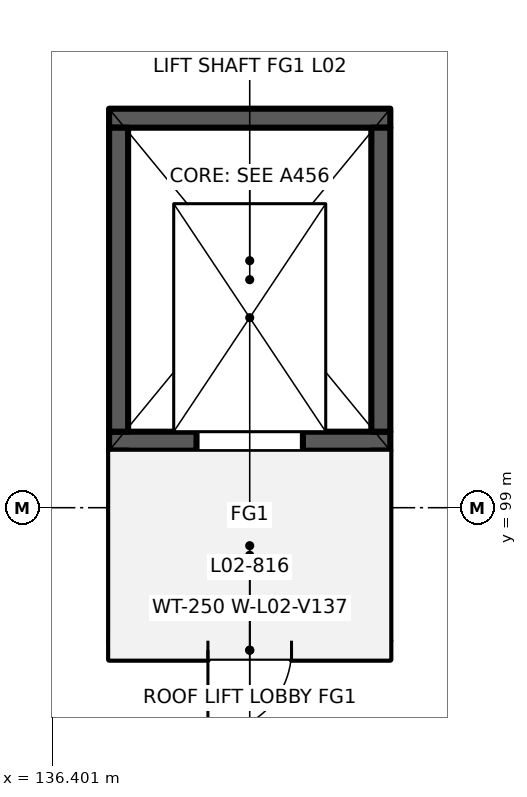
"""IFC4 building model, lengths in metres.
Left out: names, types, materials, properties, quantities, classifications, styles, units other than length and angle.
Written with IfcOpenShell. Run it as: python <this file> out.ifc"""

import sys

from ifc_helpers import new_model, si_unit, direction, frame, frame_2d, origin, place, context, subcontext, project, spatial, rectangle, extrude, element, fill, save


model = new_model("IFC4")
c1 = context("Model", 3, precision=1e-05, world=origin(), true_north=direction((0.0, 1.0)))
c2 = subcontext(c1, "Body", "Model", "MODEL_VIEW")
j1 = project(units=[si_unit("LENGTHUNIT", "METRE"), si_unit("PLANEANGLEUNIT", "RADIAN")], contexts=[c1])
p1 = place(None, origin())
s1 = spatial("IfcSite", under=j1, at=p1, CompositionType="ELEMENT")
p2 = place(p1, origin())
s2 = spatial("IfcBuilding", under=s1, at=p2, CompositionType="ELEMENT")
p3 = place(p2, frame((0.0, 0.0, 10.5)))
s3 = spatial("IfcBuildingStorey", under=s2, at=p3, CompositionType="ELEMENT", Elevation=10.5)
p4 = place(p3, frame((137.15, 99.875, 0.0), z_axis=(0.0, 0.0, 1.0), x_axis=(1.0, 0.0, 0.0)))
e1 = element("IfcWall", 1, at=p4, inside=s3, PredefinedType="SHEAR", context=c2, shape_type="SweptSolid", body=[
    extrude(rectangle(XDim=3.7, YDim=0.25, at=frame_2d((1.85, 0.0))), origin(), (0.0, 0.0, 1.0), 4.5),
])
p5 = place(p4, frame((1.15, 0.0, 0.0)))
e2 = element("IfcOpeningElement", 2, at=p5, cuts=e1, PredefinedType="OPENING", context=c2, shape_type="SweptSolid", body=[
    extrude(rectangle(XDim=1.4, YDim=2.1, at=frame_2d((0.7, 1.05))), frame((0.0, 0.135, 0.0), z_axis=(0.0, -1.0, 0.0), x_axis=(1.0, 0.0, 0.0)), (0.0, 0.0, 1.0), 0.27),
])
p6 = place(p3, frame((137.15, 104.125, 0.0), z_axis=(0.0, 0.0, 1.0), x_axis=(1.0, 0.0, 0.0)))
e3 = element("IfcWall", 3, at=p6, inside=s3, PredefinedType="SHEAR", context=c2, shape_type="SweptSolid", body=[
    extrude(rectangle(XDim=3.7, YDim=0.25, at=frame_2d((1.85, 0.0))), origin(), (0.0, 0.0, 1.0), 4.5),
])
for number, where, z_axis, x_axis in (
    (4, (137.275, 100.0, 0.0), (0.0, 0.0, 1.0), (0.0, 1.0, 0.0)),
    (5, (140.725, 100.0, 0.0), (0.0, 0.0, 1.0), (0.0, 1.0, 0.0)),
):
    element("IfcWall", number, at=place(p3, frame(where, z_axis=z_axis, x_axis=x_axis)), inside=s3, PredefinedType="SHEAR", context=c2, shape_type="SweptSolid", body=[
        extrude(rectangle(XDim=4.0, YDim=0.25, at=frame_2d((2.0, 0.0))), origin(), (0.0, 0.0, 1.0), 4.5),
    ])
p7 = place(p3, frame((137.15, 97.125, 0.0), z_axis=(0.0, 0.0, 1.0), x_axis=(1.0, 0.0, 0.0)))
e6 = element("IfcWall", 6, at=p7, inside=s3, PredefinedType="SHEAR", context=c2, shape_type="SweptSolid", body=[
    extrude(rectangle(XDim=3.7, YDim=0.25, at=frame_2d((1.85, 0.0))), origin(), (0.0, 0.0, 1.0), 3.0),
])
p8 = place(p7, frame((2.4, 0.0, 0.0), z_axis=(0.0, 0.0, 1.0), x_axis=(-1.0, 0.0, 0.0)))
e7 = element("IfcOpeningElement", 7, at=p8, cuts=e6, PredefinedType="OPENING", context=c2, shape_type="SweptSolid", body=[
    extrude(rectangle(XDim=1.1, YDim=2.1, at=frame_2d((0.55, 1.05))), frame((0.0, 0.135, 0.0), z_axis=(0.0, -1.0, 0.0), x_axis=(1.0, 0.0, 0.0)), (0.0, 0.0, 1.0), 0.27),
])
for number, where, z_axis, x_axis in (
    (8, (137.275, 97.25, 0.0), (0.0, 0.0, 1.0), (0.0, 1.0, 0.0)),
    (9, (140.725, 97.25, 0.0), (0.0, 0.0, 1.0), (0.0, 1.0, 0.0)),
):
    element("IfcWall", number, at=place(p3, frame(where, z_axis=z_axis, x_axis=x_axis)), inside=s3, PredefinedType="SHEAR", context=c2, shape_type="SweptSolid", body=[
        extrude(rectangle(XDim=2.5, YDim=0.25, at=frame_2d((1.25, 0.0))), origin(), (0.0, 0.0, 1.0), 3.0),
    ])
p9 = place(p5, origin())
e10 = element("IfcDoor", 10, at=p9, inside=s3, OperationType="DOUBLE_DOOR_SLIDING", PredefinedType="DOOR", context=c2, shape_type="SweptSolid", body=[
    extrude(rectangle(XDim=1.4, YDim=2.1, at=frame_2d((0.7, 1.05))), frame((0.0, 0.025, 0.0), z_axis=(0.0, -1.0, 0.0), x_axis=(1.0, 0.0, 0.0)), (0.0, 0.0, 1.0), 0.05),
])
fill(e2, e10)
p10 = place(p8, origin())
e11 = element("IfcDoor", 11, at=p10, inside=s3, OperationType="SINGLE_SWING_RIGHT", PredefinedType="DOOR", context=c2, shape_type="SweptSolid", body=[
    extrude(rectangle(XDim=1.1, YDim=2.1, at=frame_2d((0.55, 1.05))), frame((0.0, 0.025, 0.0), z_axis=(0.0, -1.0, 0.0), x_axis=(1.0, 0.0, 0.0)), (0.0, 0.0, 1.0), 0.05),
])
fill(e7, e11)
save(model, sys.argv[1])
